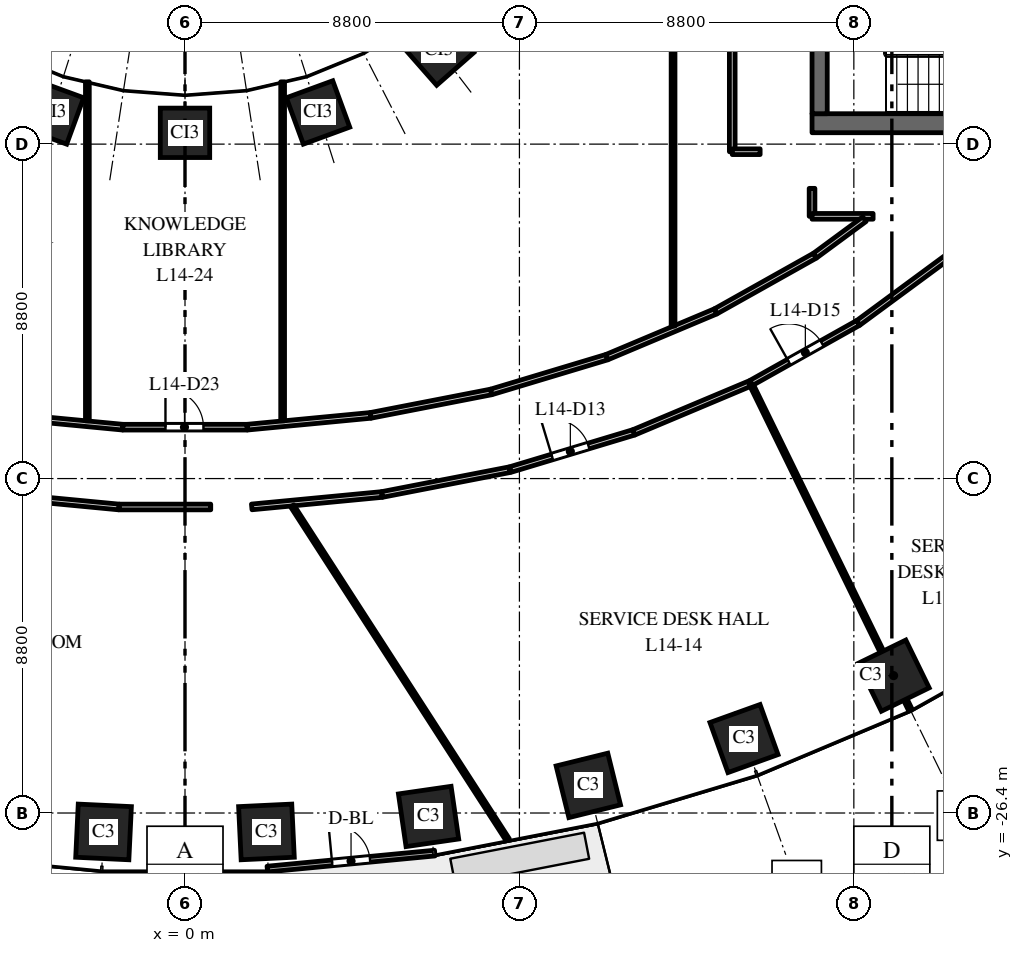
"""IFC4 building model, lengths in metres.
Left out: names, types, materials, properties, quantities, classifications, styles, units other than length and angle.
Written with IfcOpenShell. Run it as: python <this file> out.ifc"""

import sys

from ifc_helpers import new_model, si_unit, direction, frame, frame_2d, origin, origin_2d, place, context, subcontext, project, spatial, rectangle, extrude, element, fill, save


model = new_model("IFC4")
c1 = context("Model", 3, precision=1e-05, world=origin(), true_north=direction((0.0, 1.0)))
c2 = subcontext(c1, "Body", "Model", "MODEL_VIEW")
j1 = project(units=[si_unit("LENGTHUNIT", "METRE"), si_unit("PLANEANGLEUNIT", "RADIAN")], contexts=[c1])
p1 = place(None, origin())
s1 = spatial("IfcSite", under=j1, at=p1, CompositionType="ELEMENT")
p2 = place(p1, origin())
s2 = spatial("IfcBuilding", under=s1, at=p2, CompositionType="ELEMENT")
p3 = place(p2, frame((0.0, 0.0, 66.5)))
s3 = spatial("IfcBuildingStorey", under=s2, at=p3, CompositionType="ELEMENT", Elevation=66.5)
for number, where, z_axis, x_axis in (
    (1, (-2.143, -26.898, 0.0), (0.0, 0.0, 1.0), (0.999, -0.048, 0.0)),
    (2, (2.143, -26.898, 0.0), (0.0, 0.0, 1.0), (0.999, 0.048, 0.0)),
    (3, (6.409, -26.491, 0.0), (0.0, 0.0, 1.0), (0.99, 0.143, 0.0)),
    (4, (10.613, -25.674, 0.0), (0.0, 0.0, 1.0), (0.971, 0.24, 0.0)),
    (5, (14.709, -24.441, 0.0), (0.0, 0.0, 1.0), (0.941, 0.338, 0.0)),
    (6, (18.646, -22.785, 0.0), (0.0, 0.0, 1.0), (0.898, 0.439, 0.0)),
):
    element("IfcColumn", number, at=place(p3, frame(where, z_axis=z_axis, x_axis=x_axis)), inside=s3, PredefinedType="COLUMN", context=c2, shape_type="SweptSolid", body=[
        extrude(rectangle(XDim=1.4, YDim=1.4, at=origin_2d()), origin(), (0.0, 0.0, 1.0), 4.0),
    ])
for number, where, z_axis, x_axis in (
    (7, (-3.501, -7.967, 0.0), (0.0, 0.0, 1.0), (0.939, -0.344, 0.0)),
    (8, (0.0, -8.503, 0.0), (0.0, 0.0, 1.0), (1.0, 0.0, 0.0)),
    (9, (3.501, -7.967, 0.0), (0.0, 0.0, 1.0), (0.939, 0.344, 0.0)),
    (10, (6.682, -6.334, 0.0), (0.0, 0.0, 1.0), (0.751, 0.66, 0.0)),
):
    element("IfcColumn", number, at=place(p3, frame(where, z_axis=z_axis, x_axis=x_axis)), inside=s3, PredefinedType="COLUMN", context=c2, shape_type="SweptSolid", body=[
        extrude(rectangle(XDim=1.3, YDim=1.3, at=origin_2d()), origin(), (0.0, 0.0, 1.0), 4.0),
    ])
p4 = place(p3, frame((16.5, -8.25, 0.0), z_axis=(0.0, 0.0, 1.0), x_axis=(1.0, 0.0, 0.0)))
e11 = element("IfcWall", 11, at=p4, inside=s3, PredefinedType="SHEAR", context=c2, shape_type="SweptSolid", body=[
    extrude(rectangle(XDim=15.0, YDim=0.5, at=frame_2d((7.5, 0.0))), origin(), (0.0, 0.0, 1.0), 3.7),
])
p5 = place(p4, frame((6.9, 0.0, 0.0)))
e12 = element("IfcOpeningElement", 12, at=p5, cuts=e11, PredefinedType="OPENING", context=c2, shape_type="SweptSolid", body=[
    extrude(rectangle(XDim=1.2, YDim=2.1, at=frame_2d((0.6, 1.05))), frame((0.0, 0.26, 0.0), z_axis=(0.0, -1.0, 0.0), x_axis=(1.0, 0.0, 0.0)), (0.0, 0.0, 1.0), 0.52),
])
p6 = place(p4, frame((12.95, 0.0, 0.0)))
e13 = element("IfcOpeningElement", 13, at=p6, cuts=e11, PredefinedType="OPENING", context=c2, shape_type="SweptSolid", body=[
    extrude(rectangle(XDim=0.9, YDim=2.1, at=frame_2d((0.45, 1.05))), frame((0.0, 0.26, 0.0), z_axis=(0.0, -1.0, 0.0), x_axis=(1.0, 0.0, 0.0)), (0.0, 0.0, 1.0), 0.52),
])
p7 = place(p3, frame((16.7, -8.0, 0.0), z_axis=(0.0, 0.0, 1.0), x_axis=(0.0, 1.0, 0.0)))
e14 = element("IfcWall", 14, at=p7, inside=s3, PredefinedType="SHEAR", context=c2, shape_type="SweptSolid", body=[
    extrude(rectangle(XDim=16.0, YDim=0.4, at=frame_2d((8.0, 0.0))), origin(), (0.0, 0.0, 1.0), 3.7),
])
p8 = place(p3, frame((2.166, -27.875, 0.0), z_axis=(0.0, 0.0, 1.0), x_axis=(0.995473879823, 0.095035543824, 0.0)))
e15 = element("IfcWall", 15, at=p8, inside=s3, PredefinedType="STANDARD", context=c2, shape_type="SweptSolid", body=[
    extrude(rectangle(XDim=4.426, YDim=0.15, at=frame_2d((2.213, 0.0))), origin(), (0.0, 0.0, 1.0), 3.7),
])
p9 = place(p8, frame((1.713, 0.0, 0.0)))
e16 = element("IfcOpeningElement", 16, at=p9, cuts=e15, PredefinedType="OPENING", context=c2, shape_type="SweptSolid", body=[
    extrude(rectangle(XDim=1.0, YDim=2.4, at=frame_2d((0.5, 1.2))), frame((0.0, 0.085, 0.0), z_axis=(0.0, -1.0, 0.0), x_axis=(1.0, 0.0, 0.0)), (0.0, 0.0, 1.0), 0.17),
])
p10 = place(p3, frame((-5.184, -18.019, 0.0), z_axis=(0.0, 0.0, 1.0), x_axis=(0.995482474707, -0.09494547146, 0.0)))
e17 = element("IfcWall", 17, at=p10, inside=s3, PredefinedType="PARTITIONING", context=c2, shape_type="SweptSolid", body=[
    extrude(rectangle(XDim=3.464, YDim=0.15, at=frame_2d((1.732, 0.0))), origin(), (0.0, 0.0, 1.0), 3.7),
])
p11 = place(p3, frame((-4.884, -15.938, 0.0), z_axis=(0.0, 0.0, 1.0), x_axis=(0.99547459835, -0.095028017131, 0.0)))
e18 = element("IfcWall", 18, at=p11, inside=s3, PredefinedType="PARTITIONING", context=c2, shape_type="SweptSolid", body=[
    extrude(rectangle(XDim=3.263, YDim=0.15, at=frame_2d((1.631, 0.0))), origin(), (0.0, 0.0, 1.0), 3.7),
])
p12 = place(p3, frame((-2.569, -16.08, 0.0), z_axis=(0.0, 0.0, 1.0), x_axis=(0.0, 1.0, 0.0)))
e19 = element("IfcWall", 19, at=p12, inside=s3, PredefinedType="PARTITIONING", context=c2, shape_type="SweptSolid", body=[
    extrude(rectangle(XDim=8.919, YDim=0.1, at=frame_2d((4.459, 0.0))), origin(), (0.0, 0.0, 1.0), 2.85),
])
p13 = place(p3, frame((-1.736, -18.348, 0.0), z_axis=(0.0, 0.0, 1.0), x_axis=(1.0, 0.0, 0.0)))
e20 = element("IfcWall", 20, at=p13, inside=s3, PredefinedType="PARTITIONING", context=c2, shape_type="SweptSolid", body=[
    extrude(rectangle(XDim=2.413, YDim=0.15, at=frame_2d((1.207, 0.0))), origin(), (0.0, 0.0, 1.0), 2.85),
])
p14 = place(p3, frame((-1.636, -16.248, 0.0), z_axis=(0.0, 0.0, 1.0), x_axis=(1.0, 0.0, 0.0)))
e21 = element("IfcWall", 21, at=p14, inside=s3, PredefinedType="PARTITIONING", context=c2, shape_type="SweptSolid", body=[
    extrude(rectangle(XDim=3.272, YDim=0.15, at=frame_2d((1.636, 0.0))), origin(), (0.0, 0.0, 1.0), 2.85),
])
p15 = place(p14, frame((1.122, 0.0, 0.0)))
e22 = element("IfcOpeningElement", 22, at=p15, cuts=e21, PredefinedType="OPENING", context=c2, shape_type="SweptSolid", body=[
    extrude(rectangle(XDim=1.0, YDim=2.1, at=frame_2d((0.5, 1.05))), frame((0.0, 0.085, 0.0), z_axis=(0.0, -1.0, 0.0), x_axis=(1.0, 0.0, 0.0)), (0.0, 0.0, 1.0), 0.17),
])
p16 = place(p3, frame((1.636, -16.248, 0.0), z_axis=(0.0, 0.0, 1.0), x_axis=(0.99547459835, 0.095028017131, 0.0)))
e23 = element("IfcWall", 23, at=p16, inside=s3, PredefinedType="PARTITIONING", context=c2, shape_type="SweptSolid", body=[
    extrude(rectangle(XDim=3.263, YDim=0.15, at=frame_2d((1.631, 0.0))), origin(), (0.0, 0.0, 1.0), 2.85),
])
p17 = place(p3, frame((1.756, -18.346, 0.0), z_axis=(0.0, 0.0, 1.0), x_axis=(0.99548367506, 0.094932885187, 0.0)))
e24 = element("IfcWall", 24, at=p17, inside=s3, PredefinedType="PARTITIONING", context=c2, shape_type="SweptSolid", body=[
    extrude(rectangle(XDim=3.444, YDim=0.15, at=frame_2d((1.722, 0.0))), origin(), (0.0, 0.0, 1.0), 2.85),
])
p18 = place(p3, frame((2.569, -16.08, 0.0), z_axis=(0.0, 0.0, 1.0), x_axis=(0.0, 1.0, 0.0)))
e25 = element("IfcWall", 25, at=p18, inside=s3, PredefinedType="PARTITIONING", context=c2, shape_type="SweptSolid", body=[
    extrude(rectangle(XDim=8.919, YDim=0.1, at=frame_2d((4.459, 0.0))), origin(), (0.0, 0.0, 1.0), 2.85),
])
p19 = place(p3, frame((2.822, -18.32, 0.0), z_axis=(0.0, 0.0, 1.0), x_axis=(0.54232046371, -0.840171717354, 0.0)))
e26 = element("IfcWall", 26, at=p19, inside=s3, PredefinedType="PARTITIONING", context=c2, shape_type="SweptSolid", body=[
    extrude(rectangle(XDim=10.455, YDim=0.1, at=frame_2d((5.228, 0.0))), origin(), (0.0, 0.0, 1.0), 2.85),
])
p20 = place(p3, frame((4.884, -15.938, 0.0), z_axis=(0.0, 0.0, 1.0), x_axis=(0.981604377859, 0.190926282547, 0.0)))
e27 = element("IfcWall", 27, at=p20, inside=s3, PredefinedType="PARTITIONING", context=c2, shape_type="SweptSolid", body=[
    extrude(rectangle(XDim=3.231, YDim=0.15, at=frame_2d((1.616, 0.0))), origin(), (0.0, 0.0, 1.0), 3.7),
])
p21 = place(p3, frame((5.184, -18.019, 0.0), z_axis=(0.0, 0.0, 1.0), x_axis=(0.981650299947, 0.190690032812, 0.0)))
e28 = element("IfcWall", 28, at=p21, inside=s3, PredefinedType="PARTITIONING", context=c2, shape_type="SweptSolid", body=[
    extrude(rectangle(XDim=3.42, YDim=0.15, at=frame_2d((1.71, 0.0))), origin(), (0.0, 0.0, 1.0), 3.7),
])
p22 = place(p3, frame((8.056, -15.321, 0.0), z_axis=(0.0, 0.0, 1.0), x_axis=(0.957612601062, 0.28805920622, 0.0)))
e29 = element("IfcWall", 29, at=p22, inside=s3, PredefinedType="PARTITIONING", context=c2, shape_type="SweptSolid", body=[
    extrude(rectangle(XDim=3.18, YDim=0.15, at=frame_2d((1.59, 0.0))), origin(), (0.0, 0.0, 1.0), 2.85),
])
p23 = place(p3, frame((8.56, -17.363, 0.0), z_axis=(0.0, 0.0, 1.0), x_axis=(0.95754884035, 0.28827108482, 0.0)))
e30 = element("IfcWall", 30, at=p23, inside=s3, PredefinedType="PARTITIONING", context=c2, shape_type="SweptSolid", body=[
    extrude(rectangle(XDim=3.396, YDim=0.15, at=frame_2d((1.698, 0.0))), origin(), (0.0, 0.0, 1.0), 2.85),
])
p24 = place(p23, frame((1.15, 0.0, 0.0)))
e31 = element("IfcOpeningElement", 31, at=p24, cuts=e30, PredefinedType="OPENING", context=c2, shape_type="SweptSolid", body=[
    extrude(rectangle(XDim=1.0, YDim=2.1, at=frame_2d((0.5, 1.05))), frame((0.0, 0.085, 0.0), z_axis=(0.0, -1.0, 0.0), x_axis=(1.0, 0.0, 0.0)), (0.0, 0.0, 1.0), 0.17),
])
p25 = place(p3, frame((11.101, -14.405, 0.0), z_axis=(0.0, 0.0, 1.0), x_axis=(0.921753827375, 0.387775555857, 0.0)))
e32 = element("IfcWall", 32, at=p25, inside=s3, PredefinedType="PARTITIONING", context=c2, shape_type="SweptSolid", body=[
    extrude(rectangle(XDim=3.103, YDim=0.15, at=frame_2d((1.551, 0.0))), origin(), (0.0, 0.0, 1.0), 3.7),
])
p26 = place(p3, frame((11.812, -16.384, 0.0), z_axis=(0.0, 0.0, 1.0), x_axis=(0.921839278558, 0.387572373252, 0.0)))
e33 = element("IfcWall", 33, at=p26, inside=s3, PredefinedType="PARTITIONING", context=c2, shape_type="SweptSolid", body=[
    extrude(rectangle(XDim=3.333, YDim=0.15, at=frame_2d((1.667, 0.0))), origin(), (0.0, 0.0, 1.0), 3.7),
])
p27 = place(p3, frame((12.843, -13.587, 0.0), z_axis=(0.0, 0.0, 1.0), x_axis=(0.0, 1.0, 0.0)))
e34 = element("IfcWall", 34, at=p27, inside=s3, PredefinedType="PARTITIONING", context=c2, shape_type="SweptSolid", body=[
    extrude(rectangle(XDim=27.174, YDim=0.1, at=frame_2d((13.587, 0.0))), origin(), (0.0, 0.0, 1.0), 2.75),
])
p28 = place(p3, frame((13.961, -13.202, 0.0), z_axis=(0.0, 0.0, 1.0), x_axis=(0.872164226045, 0.489213207924, 0.0)))
e35 = element("IfcWall", 35, at=p28, inside=s3, PredefinedType="PARTITIONING", context=c2, shape_type="SweptSolid", body=[
    extrude(rectangle(XDim=2.998, YDim=0.15, at=frame_2d((1.499, 0.0))), origin(), (0.0, 0.0, 1.0), 3.7),
])
p29 = place(p3, frame((14.4, -9.0, 0.0), z_axis=(0.0, 0.0, 1.0), x_axis=(0.0, 1.0, 0.0)))
e36 = element("IfcWall", 36, at=p29, inside=s3, PredefinedType="PARTITIONING", context=c2, shape_type="SweptSolid", body=[
    extrude(rectangle(XDim=18.0, YDim=0.15, at=frame_2d((9.0, 0.0))), origin(), (0.0, 0.0, 1.0), 2.75),
])
p30 = place(p29, frame((8.6, 0.0, 0.0)))
e37 = element("IfcOpeningElement", 37, at=p30, cuts=e36, PredefinedType="OPENING", context=c2, shape_type="SweptSolid", body=[
    extrude(rectangle(XDim=1.0, YDim=2.1, at=frame_2d((0.5, 1.05))), frame((0.0, 0.085, 0.0), z_axis=(0.0, -1.0, 0.0), x_axis=(1.0, 0.0, 0.0)), (0.0, 0.0, 1.0), 0.17),
])
p31 = place(p3, frame((14.4, -9.0, 0.0), z_axis=(0.0, 0.0, 1.0), x_axis=(1.0, 0.0, 0.0)))
e38 = element("IfcWall", 38, at=p31, inside=s3, PredefinedType="PARTITIONING", context=c2, shape_type="SweptSolid", body=[
    extrude(rectangle(XDim=0.734, YDim=0.15, at=frame_2d((0.367, 0.0))), origin(), (0.0, 0.0, 1.0), 3.7),
])
p32 = place(p3, frame((14.887, -15.096, 0.0), z_axis=(0.0, 0.0, 1.0), x_axis=(0.439197765869, -0.89839040648, 0.0)))
e39 = element("IfcWall", 39, at=p32, inside=s3, PredefinedType="PARTITIONING", context=c2, shape_type="SweptSolid", body=[
    extrude(rectangle(XDim=9.561, YDim=0.1, at=frame_2d((4.78, 0.0))), origin(), (0.0, 0.0, 1.0), 2.85),
])
p33 = place(p3, frame((14.902, -15.082, 0.0), z_axis=(0.0, 0.0, 1.0), x_axis=(0.872144615544, 0.489248167679, 0.0)))
e40 = element("IfcWall", 40, at=p33, inside=s3, PredefinedType="PARTITIONING", context=c2, shape_type="SweptSolid", body=[
    extrude(rectangle(XDim=3.228, YDim=0.15, at=frame_2d((1.614, 0.0))), origin(), (0.0, 0.0, 1.0), 3.7),
])
p34 = place(p33, frame((1.13, 0.0, 0.0)))
e41 = element("IfcOpeningElement", 41, at=p34, cuts=e40, PredefinedType="OPENING", context=c2, shape_type="SweptSolid", body=[
    extrude(rectangle(XDim=1.0, YDim=2.1, at=frame_2d((0.5, 1.05))), frame((0.0, 0.085, 0.0), z_axis=(0.0, -1.0, 0.0), x_axis=(1.0, 0.0, 0.0)), (0.0, 0.0, 1.0), 0.17),
])
p35 = place(p3, frame((16.5, -10.7, 0.0), z_axis=(0.0, 0.0, 1.0), x_axis=(0.0, 1.0, 0.0)))
e42 = element("IfcWall", 42, at=p35, inside=s3, PredefinedType="PARTITIONING", context=c2, shape_type="SweptSolid", body=[
    extrude(rectangle(XDim=0.736, YDim=0.15, at=frame_2d((0.368, 0.0))), origin(), (0.0, 0.0, 1.0), 3.7),
])
p36 = place(p3, frame((16.5, -10.7, 0.0), z_axis=(0.0, 0.0, 1.0), x_axis=(1.0, 0.0, 0.0)))
e43 = element("IfcWall", 43, at=p36, inside=s3, PredefinedType="PARTITIONING", context=c2, shape_type="SweptSolid", body=[
    extrude(rectangle(XDim=1.607, YDim=0.15, at=frame_2d((0.803, 0.0))), origin(), (0.0, 0.0, 1.0), 3.7),
])
p37 = place(p3, frame((16.576, -11.735, 0.0), z_axis=(0.0, 0.0, 1.0), x_axis=(0.805021714708, 0.593245344566, 0.0)))
e44 = element("IfcWall", 44, at=p37, inside=s3, PredefinedType="PARTITIONING", context=c2, shape_type="SweptSolid", body=[
    extrude(rectangle(XDim=1.619, YDim=0.15, at=frame_2d((0.809, 0.0))), origin(), (0.0, 0.0, 1.0), 3.7),
])
p38 = place(p3, frame((17.717, -13.503, 0.0), z_axis=(0.0, 0.0, 1.0), x_axis=(0.805106688633, 0.593130019404, 0.0)))
e45 = element("IfcWall", 45, at=p38, inside=s3, PredefinedType="PARTITIONING", context=c2, shape_type="SweptSolid", body=[
    extrude(rectangle(XDim=3.137, YDim=0.15, at=frame_2d((1.569, 0.0))), origin(), (0.0, 0.0, 1.0), 3.7),
])
p39 = place(p9, origin())
e46 = element("IfcDoor", 46, at=p39, inside=s3, OperationType="SINGLE_SWING_LEFT", PredefinedType="DOOR", context=c2, shape_type="SweptSolid", body=[
    extrude(rectangle(XDim=1.0, YDim=2.4, at=frame_2d((0.5, 1.2))), frame((0.0, 0.025, 0.0), z_axis=(0.0, -1.0, 0.0), x_axis=(1.0, 0.0, 0.0)), (0.0, 0.0, 1.0), 0.05),
])
fill(e16, e46)
p40 = place(p24, origin())
e47 = element("IfcDoor", 47, at=p40, inside=s3, OperationType="SINGLE_SWING_LEFT", PredefinedType="DOOR", context=c2, shape_type="SweptSolid", body=[
    extrude(rectangle(XDim=1.0, YDim=2.1, at=frame_2d((0.5, 1.05))), frame((0.0, 0.025, 0.0), z_axis=(0.0, -1.0, 0.0), x_axis=(1.0, 0.0, 0.0)), (0.0, 0.0, 1.0), 0.05),
])
fill(e31, e47)
p41 = place(p34, origin())
e48 = element("IfcDoor", 48, at=p41, inside=s3, OperationType="SINGLE_SWING_LEFT", PredefinedType="DOOR", context=c2, shape_type="SweptSolid", body=[
    extrude(rectangle(XDim=1.0, YDim=2.1, at=frame_2d((0.5, 1.05))), frame((0.0, 0.025, 0.0), z_axis=(0.0, -1.0, 0.0), x_axis=(1.0, 0.0, 0.0)), (0.0, 0.0, 1.0), 0.05),
])
fill(e41, e48)
p42 = place(p15, origin())
e49 = element("IfcDoor", 49, at=p42, inside=s3, OperationType="SINGLE_SWING_LEFT", PredefinedType="DOOR", context=c2, shape_type="SweptSolid", body=[
    extrude(rectangle(XDim=1.0, YDim=2.1, at=frame_2d((0.5, 1.05))), frame((0.0, 0.025, 0.0), z_axis=(0.0, -1.0, 0.0), x_axis=(1.0, 0.0, 0.0)), (0.0, 0.0, 1.0), 0.05),
])
fill(e22, e49)
save(model, sys.argv[1])
